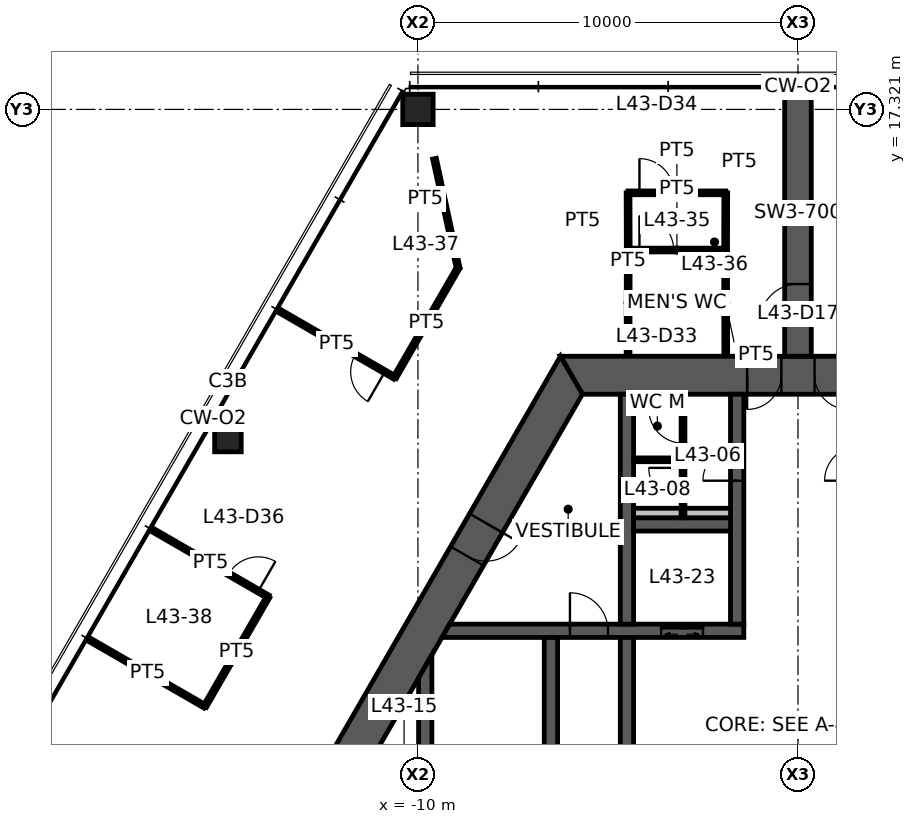
"""IFC4 building model, lengths in metres.
Left out: names, types, materials, properties, quantities, classifications, styles, units other than length and angle.
Written with IfcOpenShell. Run it as: python <this file> out.ifc"""

import sys

from ifc_helpers import new_model, si_unit, direction, frame, frame_2d, origin, origin_2d, place, context, subcontext, project, spatial, polyline, rectangle, hollow_rectangle, outline, extrude, element, fill, save


model = new_model("IFC4")
c1 = context("Model", 3, precision=1e-05, world=origin(), true_north=direction((0.0, 1.0)))
c2 = subcontext(c1, "Body", "Model", "MODEL_VIEW")
j1 = project(units=[si_unit("LENGTHUNIT", "METRE"), si_unit("PLANEANGLEUNIT", "RADIAN")], contexts=[c1])
p1 = place(None, origin())
s1 = spatial("IfcSite", under=j1, at=p1, CompositionType="ELEMENT")
p2 = place(p1, origin())
s2 = spatial("IfcBuilding", under=s1, at=p2, CompositionType="ELEMENT")
p3 = place(p2, frame((0.0, 0.0, 172.1)))
s3 = spatial("IfcBuildingStorey", under=s2, at=p3, CompositionType="ELEMENT", Elevation=172.1)
p4 = place(p3, frame((-10.0, 17.321, 0.0), z_axis=(0.0, 0.0, 1.0), x_axis=(1.0, 0.0, 0.0)))
e1 = element("IfcColumn", 1, at=p4, inside=s3, PredefinedType="COLUMN", context=c2, shape_type="SweptSolid", body=[
    extrude(hollow_rectangle(XDim=0.8, YDim=0.8, WallThickness=0.045, at=origin_2d()), origin(), (0.0, 0.0, 1.0), 3.9),
])
p5 = place(p3, frame((-15.0, 8.66, 0.0), z_axis=(0.0, 0.0, 1.0), x_axis=(1.0, 0.0, 0.0)))
e2 = element("IfcColumn", 2, at=p5, inside=s3, PredefinedType="COLUMN", context=c2, shape_type="SweptSolid", body=[
    extrude(hollow_rectangle(XDim=0.7, YDim=0.7, WallThickness=0.036, at=origin_2d()), origin(), (0.0, 0.0, 1.0), 3.9),
])
p6 = place(p3, frame((5.961, 10.325, 0.0), z_axis=(0.0, 0.0, 1.0), x_axis=(-1.0, 0.0, 0.0)))
e3 = element("IfcWall", 3, at=p6, inside=s3, PredefinedType="SHEAR", context=c2, shape_type="SweptSolid", body=[
    extrude(outline(polyline([(-0.289, -0.5), (4.624, -0.5), (5.523, -0.5), (6.399, -0.5), (7.299, -0.5), (12.211, -0.5), (11.634, 0.5), (7.299, 0.5), (6.399, 0.5), (5.523, 0.5), (4.624, 0.5), (0.289, 0.5), (-0.289, -0.5)])), origin(), (0.0, 0.0, 1.0), 3.9),
])
p7 = place(p6, frame((6.399, 0.0, 0.0)))
e4 = element("IfcOpeningElement", 4, at=p7, cuts=e3, PredefinedType="OPENING", context=c2, shape_type="SweptSolid", body=[
    extrude(rectangle(XDim=0.9, YDim=2.1, at=frame_2d((0.45, 1.05))), frame((0.0, 0.51, 0.0), z_axis=(0.0, -1.0, 0.0), x_axis=(1.0, 0.0, 0.0)), (0.0, 0.0, 1.0), 1.02),
])
p8 = place(p6, frame((4.624, 0.0, 0.0)))
e5 = element("IfcOpeningElement", 5, at=p8, cuts=e3, PredefinedType="OPENING", context=c2, shape_type="SweptSolid", body=[
    extrude(rectangle(XDim=0.9, YDim=2.1, at=frame_2d((0.45, 1.05))), frame((0.0, 0.51, 0.0), z_axis=(0.0, -1.0, 0.0), x_axis=(1.0, 0.0, 0.0)), (0.0, 0.0, 1.0), 1.02),
])
p9 = place(p3, frame((-5.961, 10.325, 0.0), z_axis=(0.0, 0.0, 1.0), x_axis=(-0.500004296715, -0.866022923061, 0.0)))
e6 = element("IfcWall", 6, at=p9, inside=s3, PredefinedType="SHEAR", context=c2, shape_type="SweptSolid", body=[
    extrude(outline(polyline([(-0.289, -0.5), (4.494, -0.5), (5.494, -0.5), (12.211, -0.5), (11.634, 0.5), (5.494, 0.5), (4.494, 0.5), (0.289, 0.5), (-0.289, -0.5)])), origin(), (0.0, 0.0, 1.0), 3.9),
])
p10 = place(p9, frame((4.494, 0.0, 0.0)))
e7 = element("IfcOpeningElement", 7, at=p10, cuts=e6, PredefinedType="OPENING", context=c2, shape_type="SweptSolid", body=[
    extrude(rectangle(XDim=1.0, YDim=2.1, at=frame_2d((0.5, 1.05))), frame((0.0, 0.51, 0.0), z_axis=(0.0, -1.0, 0.0), x_axis=(1.0, 0.0, 0.0)), (0.0, 0.0, 1.0), 1.02),
])
p11 = place(p3, frame((0.0, 10.825, 0.0), z_axis=(0.0, 0.0, 1.0), x_axis=(0.0, 1.0, 0.0)))
e8 = element("IfcWall", 8, at=p11, inside=s3, PredefinedType="SHEAR", context=c2, shape_type="SweptSolid", body=[
    extrude(rectangle(XDim=6.946, YDim=0.7, at=frame_2d((3.473, 0.0))), origin(), (0.0, 0.0, 1.0), 3.9),
])
p12 = place(p11, frame((0.9, 0.0, 0.0)))
e9 = element("IfcOpeningElement", 9, at=p12, cuts=e8, PredefinedType="OPENING", context=c2, shape_type="SweptSolid", body=[
    extrude(rectangle(XDim=1.0, YDim=2.1, at=frame_2d((0.5, 1.05))), frame((0.0, 0.36, 0.0), z_axis=(0.0, -1.0, 0.0), x_axis=(1.0, 0.0, 0.0)), (0.0, 0.0, 1.0), 0.72),
])
p13 = place(p3, frame((-9.266, 3.6, 0.0), z_axis=(0.0, 0.0, 1.0), x_axis=(1.0, 0.0, 0.0)))
e10 = element("IfcWall", 10, at=p13, inside=s3, PredefinedType="SHEAR", context=c2, shape_type="SweptSolid", body=[
    extrude(outline(polyline([(-0.101, -0.175), (3.266, -0.175), (4.266, -0.175), (5.667, -0.175), (6.767, -0.175), (7.841, -0.175), (7.841, 0.175), (6.767, 0.175), (5.667, 0.175), (4.266, 0.175), (3.266, 0.175), (0.101, 0.175), (-0.101, -0.175)])), origin(), (0.0, 0.0, 1.0), 3.9),
])
p14 = place(p13, frame((3.266, 0.0, 0.0)))
e11 = element("IfcOpeningElement", 11, at=p14, cuts=e10, PredefinedType="OPENING", context=c2, shape_type="SweptSolid", body=[
    extrude(rectangle(XDim=1.0, YDim=2.1, at=frame_2d((0.5, 1.05))), frame((0.0, 0.185, 0.0), z_axis=(0.0, -1.0, 0.0), x_axis=(1.0, 0.0, 0.0)), (0.0, 0.0, 1.0), 0.37),
])
p15 = place(p13, frame((5.667, 0.0, 0.0)))
e12 = element("IfcOpeningElement", 12, at=p15, cuts=e10, PredefinedType="OPENING", context=c2, shape_type="SweptSolid", body=[
    extrude(rectangle(XDim=1.1, YDim=2.1, at=frame_2d((0.55, 1.05))), frame((0.0, 0.185, 0.0), z_axis=(0.0, -1.0, 0.0), x_axis=(1.0, 0.0, 0.0)), (0.0, 0.0, 1.0), 0.37),
])
p16 = place(p3, frame((-1.6, 3.775, 0.0), z_axis=(0.0, 0.0, 1.0), x_axis=(0.0, 1.0, 0.0)))
e13 = element("IfcWall", 13, at=p16, inside=s3, PredefinedType="SHEAR", context=c2, shape_type="SweptSolid", body=[
    extrude(rectangle(XDim=6.05, YDim=0.35, at=frame_2d((3.025, 0.0))), origin(), (0.0, 0.0, 1.0), 3.9),
])
p17 = place(p16, frame((3.775, 0.0, 0.0)))
e14 = element("IfcOpeningElement", 14, at=p17, cuts=e13, PredefinedType="OPENING", context=c2, shape_type="SweptSolid", body=[
    extrude(rectangle(XDim=0.9, YDim=2.1, at=frame_2d((0.45, 1.05))), frame((0.0, 0.185, 0.0), z_axis=(0.0, -1.0, 0.0), x_axis=(1.0, 0.0, 0.0)), (0.0, 0.0, 1.0), 0.37),
])
p18 = place(p3, frame((-4.5, -3.425, 0.0), z_axis=(0.0, 0.0, 1.0), x_axis=(0.0, 1.0, 0.0)))
e15 = element("IfcWall", 15, at=p18, inside=s3, PredefinedType="SHEAR", context=c2, shape_type="SweptSolid", body=[
    extrude(rectangle(XDim=6.85, YDim=0.35, at=frame_2d((3.425, 0.0))), origin(), (0.0, 0.0, 1.0), 3.9),
])
p19 = place(p18, frame((2.925, 0.0, 0.0)))
e16 = element("IfcOpeningElement", 16, at=p19, cuts=e15, PredefinedType="OPENING", context=c2, shape_type="SweptSolid", body=[
    extrude(rectangle(XDim=1.0, YDim=2.1, at=frame_2d((0.5, 1.05))), frame((0.0, 0.185, 0.0), z_axis=(0.0, -1.0, 0.0), x_axis=(1.0, 0.0, 0.0)), (0.0, 0.0, 1.0), 0.37),
])
p20 = place(p3, frame((-6.5, -3.425, 0.0), z_axis=(0.0, 0.0, 1.0), x_axis=(0.0, 1.0, 0.0)))
e17 = element("IfcWall", 17, at=p20, inside=s3, PredefinedType="SHEAR", context=c2, shape_type="SweptSolid", body=[
    extrude(rectangle(XDim=6.85, YDim=0.35, at=frame_2d((3.425, 0.0))), origin(), (0.0, 0.0, 1.0), 3.9),
])
p21 = place(p20, frame((0.1, 0.0, 0.0)))
e18 = element("IfcOpeningElement", 18, at=p21, cuts=e17, PredefinedType="OPENING", context=c2, shape_type="SweptSolid", body=[
    extrude(rectangle(XDim=1.0, YDim=2.1, at=frame_2d((0.5, 1.05))), frame((0.0, 0.185, 0.0), z_axis=(0.0, -1.0, 0.0), x_axis=(1.0, 0.0, 0.0)), (0.0, 0.0, 1.0), 0.37),
])
p22 = place(p3, frame((-4.5, 3.775, 0.0), z_axis=(0.0, 0.0, 1.0), x_axis=(0.0, 1.0, 0.0)))
e19 = element("IfcWall", 19, at=p22, inside=s3, PredefinedType="SHEAR", context=c2, shape_type="SweptSolid", body=[
    extrude(rectangle(XDim=6.05, YDim=0.35, at=frame_2d((3.025, 0.0))), origin(), (0.0, 0.0, 1.0), 3.9),
])
p23 = place(p3, frame((-4.325, 6.4, 0.0), z_axis=(0.0, 0.0, 1.0), x_axis=(1.0, 0.0, 0.0)))
e20 = element("IfcWall", 20, at=p23, inside=s3, PredefinedType="SHEAR", context=c2, shape_type="SweptSolid", body=[
    extrude(rectangle(XDim=2.55, YDim=0.35, at=frame_2d((1.275, 0.0))), origin(), (0.0, 0.0, 1.0), 3.9),
])
p24 = place(p3, frame((-9.808, -2.662, 0.0), z_axis=(0.0, 0.0, 1.0), x_axis=(0.0, 1.0, 0.0)))
e21 = element("IfcWall", 21, at=p24, inside=s3, PredefinedType="SHEAR", context=c2, shape_type="SweptSolid", body=[
    extrude(outline(polyline([(-0.303, -0.175), (5.628, -0.175), (5.021, 0.175), (0.303, 0.175), (-0.303, -0.175)])), origin(), (0.0, 0.0, 1.0), 3.9),
])
p25 = place(p3, frame((-4.325, 6.7, 0.0), z_axis=(0.0, 0.0, 1.0), x_axis=(1.0, 0.0, 0.0)))
e22 = element("IfcWall", 22, at=p25, inside=s3, PredefinedType="PLUMBINGWALL", context=c2, shape_type="SweptSolid", body=[
    extrude(rectangle(XDim=2.55, YDim=0.25, at=frame_2d((1.275, 0.0))), origin(), (0.0, 0.0, 1.0), 3.9),
])
p26 = place(p3, frame((-3.025, 6.575, 0.0), z_axis=(0.0, 0.0, 1.0), x_axis=(0.0, 1.0, 0.0)))
e23 = element("IfcWall", 23, at=p26, inside=s3, PredefinedType="PARTITIONING", context=c2, shape_type="SweptSolid", body=[
    extrude(rectangle(XDim=3.25, YDim=0.1, at=frame_2d((1.625, 0.0))), origin(), (0.0, 0.0, 1.0), 2.95),
])
p27 = place(p26, frame((1.962, 0.0, 0.0)))
e24 = element("IfcOpeningElement", 24, at=p27, cuts=e23, PredefinedType="OPENING", context=c2, shape_type="SweptSolid", body=[
    extrude(rectangle(XDim=0.9, YDim=2.1, at=frame_2d((0.45, 1.05))), frame((0.0, 0.06, 0.0), z_axis=(0.0, -1.0, 0.0), x_axis=(1.0, 0.0, 0.0)), (0.0, 0.0, 1.0), 0.12),
])
p28 = place(p26, frame((0.413, 0.0, 0.0)))
e25 = element("IfcOpeningElement", 25, at=p28, cuts=e23, PredefinedType="OPENING", context=c2, shape_type="SweptSolid", body=[
    extrude(rectangle(XDim=0.9, YDim=2.1, at=frame_2d((0.45, 1.05))), frame((0.0, 0.06, 0.0), z_axis=(0.0, -1.0, 0.0), x_axis=(1.0, 0.0, 0.0)), (0.0, 0.0, 1.0), 0.12),
])
p29 = place(p3, frame((-3.075, 8.1, 0.0), z_axis=(0.0, 0.0, 1.0), x_axis=(-1.0, 0.0, 0.0)))
e26 = element("IfcWall", 26, at=p29, inside=s3, PredefinedType="PARTITIONING", context=c2, shape_type="SweptSolid", body=[
    extrude(rectangle(XDim=1.25, YDim=0.1, at=frame_2d((0.625, 0.0))), origin(), (0.0, 0.0, 1.0), 2.95),
])
p30 = place(p3, frame((-4.471, 13.62, 0.0), z_axis=(0.0, 0.0, 1.0), x_axis=(1.0, 0.0, 0.0)))
e27 = element("IfcWall", 27, at=p30, inside=s3, PredefinedType="PARTITIONING", context=c2, shape_type="SweptSolid", body=[
    extrude(rectangle(XDim=2.571, YDim=0.1, at=frame_2d((1.286, 0.0))), origin(), (0.0, 0.0, 1.0), 2.95),
])
p31 = place(p30, frame((0.3, 0.0, 0.0)))
e28 = element("IfcOpeningElement", 28, at=p31, cuts=e27, PredefinedType="OPENING", context=c2, shape_type="SweptSolid", body=[
    extrude(rectangle(XDim=0.9, YDim=2.1, at=frame_2d((0.45, 1.05))), frame((0.0, 0.06, 0.0), z_axis=(0.0, -1.0, 0.0), x_axis=(1.0, 0.0, 0.0)), (0.0, 0.0, 1.0), 0.12),
])
for number, where, z_axis, x_axis in (
    (29, (-4.471, 10.845, 0.0), (0.0, 0.0, 1.0), (0.002, 1.0, 0.0)),
    (30, (-1.905, 13.625, 0.0), (0.0, 0.0, 1.0), (0.002, -1.0, 0.0)),
):
    element("IfcWall", number, at=place(p3, frame(where, z_axis=z_axis, x_axis=x_axis)), inside=s3, PredefinedType="PARTITIONING", context=c2, shape_type="SweptSolid", body=[
        extrude(rectangle(XDim=2.78, YDim=0.1, at=frame_2d((1.39, 0.0))), origin(), (0.0, 0.0, 1.0), 2.95),
    ])
p32 = place(p3, frame((-4.471, 15.125, 0.0), z_axis=(0.0, 0.0, 1.0), x_axis=(1.0, 0.0, 0.0)))
e31 = element("IfcWall", 31, at=p32, inside=s3, PredefinedType="PARTITIONING", context=c2, shape_type="SweptSolid", body=[
    extrude(rectangle(XDim=2.571, YDim=0.1, at=frame_2d((1.286, 0.0))), origin(), (0.0, 0.0, 1.0), 2.95),
])
p33 = place(p32, frame((0.3, 0.0, 0.0)))
e32 = element("IfcOpeningElement", 32, at=p33, cuts=e31, PredefinedType="OPENING", context=c2, shape_type="SweptSolid", body=[
    extrude(rectangle(XDim=0.9, YDim=2.1, at=frame_2d((0.45, 1.05))), frame((0.0, 0.06, 0.0), z_axis=(0.0, -1.0, 0.0), x_axis=(1.0, 0.0, 0.0)), (0.0, 0.0, 1.0), 0.12),
])
for number, where, z_axis, x_axis in (
    (33, (-4.466, 13.625, 0.0), (0.0, 0.0, 1.0), (-0.003, 1.0, 0.0)),
    (34, (-1.9, 15.125, 0.0), (0.0, 0.0, 1.0), (-0.003, -1.0, 0.0)),
):
    element("IfcWall", number, at=place(p3, frame(where, z_axis=z_axis, x_axis=x_axis)), inside=s3, PredefinedType="PARTITIONING", context=c2, shape_type="SweptSolid", body=[
        extrude(rectangle(XDim=1.5, YDim=0.1, at=frame_2d((0.75, 0.0))), origin(), (0.0, 0.0, 1.0), 2.95),
    ])
p34 = place(p3, frame((-10.61, 10.264, 0.0), z_axis=(0.0, 0.0, 1.0), x_axis=(-0.86601282795, 0.500021781351, 0.0)))
e35 = element("IfcWall", 35, at=p34, inside=s3, PredefinedType="PARTITIONING", context=c2, shape_type="SweptSolid", body=[
    extrude(rectangle(XDim=3.53, YDim=0.1, at=frame_2d((1.765, 0.0))), origin(), (0.0, 0.0, 1.0), 2.95),
])
p35 = place(p34, frame((0.3, 0.0, 0.0)))
e36 = element("IfcOpeningElement", 36, at=p35, cuts=e35, PredefinedType="OPENING", context=c2, shape_type="SweptSolid", body=[
    extrude(rectangle(XDim=0.9, YDim=2.1, at=frame_2d((0.45, 1.05))), frame((0.0, 0.06, 0.0), z_axis=(0.0, -1.0, 0.0), x_axis=(1.0, 0.0, 0.0)), (0.0, 0.0, 1.0), 0.12),
])
p36 = place(p3, frame((-9.564, 16.024, 0.0), z_axis=(0.0, 0.0, 1.0), x_axis=(0.211116290139, -0.977460951669, 0.0)))
e37 = element("IfcWall", 37, at=p36, inside=s3, PredefinedType="PARTITIONING", context=c2, shape_type="SweptSolid", body=[
    extrude(rectangle(XDim=2.941, YDim=0.1, at=frame_2d((1.47, 0.0))), origin(), (0.0, 0.0, 1.0), 2.95),
])
p37 = place(p3, frame((-8.943, 13.149, 0.0), z_axis=(0.0, 0.0, 1.0), x_axis=(-0.500189695295, -0.86591585545, 0.0)))
e38 = element("IfcWall", 38, at=p37, inside=s3, PredefinedType="PARTITIONING", context=c2, shape_type="SweptSolid", body=[
    extrude(rectangle(XDim=3.332, YDim=0.1, at=frame_2d((1.666, 0.0))), origin(), (0.0, 0.0, 1.0), 2.95),
])
p38 = place(p3, frame((-16.976, 6.248, 0.0), z_axis=(0.0, 0.0, 1.0), x_axis=(0.866001150353, -0.500042005822, 0.0)))
e39 = element("IfcWall", 39, at=p38, inside=s3, PredefinedType="PARTITIONING", context=c2, shape_type="SweptSolid", body=[
    extrude(rectangle(XDim=3.505, YDim=0.1, at=frame_2d((1.752, 0.0))), origin(), (0.0, 0.0, 1.0), 2.95),
])
p39 = place(p38, frame((2.305, 0.0, 0.0)))
e40 = element("IfcOpeningElement", 40, at=p39, cuts=e39, PredefinedType="OPENING", context=c2, shape_type="SweptSolid", body=[
    extrude(rectangle(XDim=0.9, YDim=2.1, at=frame_2d((0.45, 1.05))), frame((0.0, 0.06, 0.0), z_axis=(0.0, -1.0, 0.0), x_axis=(1.0, 0.0, 0.0)), (0.0, 0.0, 1.0), 0.12),
])
p40 = place(p3, frame((-15.606, 1.611, 0.0), z_axis=(0.0, 0.0, 1.0), x_axis=(-0.86601968407, 0.500009906705, 0.0)))
e41 = element("IfcWall", 41, at=p40, inside=s3, PredefinedType="PARTITIONING", context=c2, shape_type="SweptSolid", body=[
    extrude(rectangle(XDim=3.48, YDim=0.1, at=frame_2d((1.74, 0.0))), origin(), (0.0, 0.0, 1.0), 2.95),
])
p41 = place(p3, frame((-13.941, 4.495, 0.0), z_axis=(0.0, 0.0, 1.0), x_axis=(-0.500033344505, -0.86600615147, 0.0)))
e42 = element("IfcWall", 42, at=p41, inside=s3, PredefinedType="PARTITIONING", context=c2, shape_type="SweptSolid", body=[
    extrude(rectangle(XDim=3.331, YDim=0.1, at=frame_2d((1.666, 0.0))), origin(), (0.0, 0.0, 1.0), 2.95),
])
p42 = place(p3, frame((0.0, 17.771, 0.0), z_axis=(0.0, 0.0, 1.0), x_axis=(0.0, 1.0, 0.0)))
e43 = element("IfcWall", 43, at=p42, inside=s3, PredefinedType="PARTITIONING", context=c2, shape_type="SweptSolid", body=[
    extrude(rectangle(XDim=0.08, YDim=0.175, at=frame_2d((0.04, 0.0))), origin(), (0.0, 0.0, 1.0), 3.9),
])
p43 = place(p7, origin())
e44 = element("IfcDoor", 44, at=p43, inside=s3, OperationType="SINGLE_SWING_RIGHT", PredefinedType="DOOR", context=c2, shape_type="SweptSolid", body=[
    extrude(rectangle(XDim=0.9, YDim=2.1, at=frame_2d((0.45, 1.05))), frame((0.0, 0.025, 0.0), z_axis=(0.0, -1.0, 0.0), x_axis=(1.0, 0.0, 0.0)), (0.0, 0.0, 1.0), 0.05),
])
fill(e4, e44)
p44 = place(p8, origin())
e45 = element("IfcDoor", 45, at=p44, inside=s3, OperationType="SINGLE_SWING_LEFT", PredefinedType="DOOR", context=c2, shape_type="SweptSolid", body=[
    extrude(rectangle(XDim=0.9, YDim=2.1, at=frame_2d((0.45, 1.05))), frame((0.0, 0.025, 0.0), z_axis=(0.0, -1.0, 0.0), x_axis=(1.0, 0.0, 0.0)), (0.0, 0.0, 1.0), 0.05),
])
fill(e5, e45)
p45 = place(p10, origin())
e46 = element("IfcDoor", 46, at=p45, inside=s3, OperationType="SINGLE_SWING_LEFT", PredefinedType="DOOR", context=c2, shape_type="SweptSolid", body=[
    extrude(rectangle(XDim=1.0, YDim=2.1, at=frame_2d((0.5, 1.05))), frame((0.0, 0.025, 0.0), z_axis=(0.0, -1.0, 0.0), x_axis=(1.0, 0.0, 0.0)), (0.0, 0.0, 1.0), 0.05),
])
fill(e7, e46)
p46 = place(p14, origin())
e47 = element("IfcDoor", 47, at=p46, inside=s3, OperationType="SINGLE_SWING_LEFT", PredefinedType="DOOR", context=c2, shape_type="SweptSolid", body=[
    extrude(rectangle(XDim=1.0, YDim=2.1, at=frame_2d((0.5, 1.05))), frame((0.0, 0.025, 0.0), z_axis=(0.0, -1.0, 0.0), x_axis=(1.0, 0.0, 0.0)), (0.0, 0.0, 1.0), 0.05),
])
fill(e11, e47)
p47 = place(p17, origin())
e48 = element("IfcDoor", 48, at=p47, inside=s3, OperationType="SINGLE_SWING_LEFT", PredefinedType="DOOR", context=c2, shape_type="SweptSolid", body=[
    extrude(rectangle(XDim=0.9, YDim=2.1, at=frame_2d((0.45, 1.05))), frame((0.0, 0.025, 0.0), z_axis=(0.0, -1.0, 0.0), x_axis=(1.0, 0.0, 0.0)), (0.0, 0.0, 1.0), 0.05),
])
fill(e14, e48)
p48 = place(p12, origin())
e49 = element("IfcDoor", 49, at=p48, inside=s3, OperationType="SINGLE_SWING_LEFT", PredefinedType="DOOR", context=c2, shape_type="SweptSolid", body=[
    extrude(rectangle(XDim=1.0, YDim=2.1, at=frame_2d((0.5, 1.05))), frame((0.0, 0.025, 0.0), z_axis=(0.0, -1.0, 0.0), x_axis=(1.0, 0.0, 0.0)), (0.0, 0.0, 1.0), 0.05),
])
fill(e9, e49)
p49 = place(p27, origin())
e50 = element("IfcDoor", 50, at=p49, inside=s3, OperationType="SINGLE_SWING_RIGHT", PredefinedType="DOOR", context=c2, shape_type="SweptSolid", body=[
    extrude(rectangle(XDim=0.9, YDim=2.1, at=frame_2d((0.45, 1.05))), frame((0.0, 0.025, 0.0), z_axis=(0.0, -1.0, 0.0), x_axis=(1.0, 0.0, 0.0)), (0.0, 0.0, 1.0), 0.05),
])
fill(e24, e50)
p50 = place(p28, origin())
e51 = element("IfcDoor", 51, at=p50, inside=s3, OperationType="SINGLE_SWING_RIGHT", PredefinedType="DOOR", context=c2, shape_type="SweptSolid", body=[
    extrude(rectangle(XDim=0.9, YDim=2.1, at=frame_2d((0.45, 1.05))), frame((0.0, 0.025, 0.0), z_axis=(0.0, -1.0, 0.0), x_axis=(1.0, 0.0, 0.0)), (0.0, 0.0, 1.0), 0.05),
])
fill(e25, e51)
p51 = place(p31, origin())
e52 = element("IfcDoor", 52, at=p51, inside=s3, OperationType="SINGLE_SWING_LEFT", PredefinedType="DOOR", context=c2, shape_type="SweptSolid", body=[
    extrude(rectangle(XDim=0.9, YDim=2.1, at=frame_2d((0.45, 1.05))), frame((0.0, 0.025, 0.0), z_axis=(0.0, -1.0, 0.0), x_axis=(1.0, 0.0, 0.0)), (0.0, 0.0, 1.0), 0.05),
])
fill(e28, e52)
p52 = place(p33, origin())
e53 = element("IfcDoor", 53, at=p52, inside=s3, OperationType="SINGLE_SWING_LEFT", PredefinedType="DOOR", context=c2, shape_type="SweptSolid", body=[
    extrude(rectangle(XDim=0.9, YDim=2.1, at=frame_2d((0.45, 1.05))), frame((0.0, 0.025, 0.0), z_axis=(0.0, -1.0, 0.0), x_axis=(1.0, 0.0, 0.0)), (0.0, 0.0, 1.0), 0.05),
])
fill(e32, e53)
p53 = place(p35, origin())
e54 = element("IfcDoor", 54, at=p53, inside=s3, OperationType="SINGLE_SWING_LEFT", PredefinedType="DOOR", context=c2, shape_type="SweptSolid", body=[
    extrude(rectangle(XDim=0.9, YDim=2.1, at=frame_2d((0.45, 1.05))), frame((0.0, 0.025, 0.0), z_axis=(0.0, -1.0, 0.0), x_axis=(1.0, 0.0, 0.0)), (0.0, 0.0, 1.0), 0.05),
])
fill(e36, e54)
p54 = place(p39, origin())
e55 = element("IfcDoor", 55, at=p54, inside=s3, OperationType="SINGLE_SWING_RIGHT", PredefinedType="DOOR", context=c2, shape_type="SweptSolid", body=[
    extrude(rectangle(XDim=0.9, YDim=2.1, at=frame_2d((0.45, 1.05))), frame((0.0, 0.025, 0.0), z_axis=(0.0, -1.0, 0.0), x_axis=(1.0, 0.0, 0.0)), (0.0, 0.0, 1.0), 0.05),
])
fill(e40, e55)
p55 = place(p15, origin())
e56 = element("IfcDoor", 56, at=p55, inside=s3, OperationType="DOUBLE_DOOR_SLIDING", PredefinedType="DOOR", context=c2, shape_type="SweptSolid", body=[
    extrude(rectangle(XDim=1.1, YDim=2.1, at=frame_2d((0.55, 1.05))), frame((0.0, 0.025, 0.0), z_axis=(0.0, -1.0, 0.0), x_axis=(1.0, 0.0, 0.0)), (0.0, 0.0, 1.0), 0.05),
])
fill(e12, e56)
save(model, sys.argv[1])
